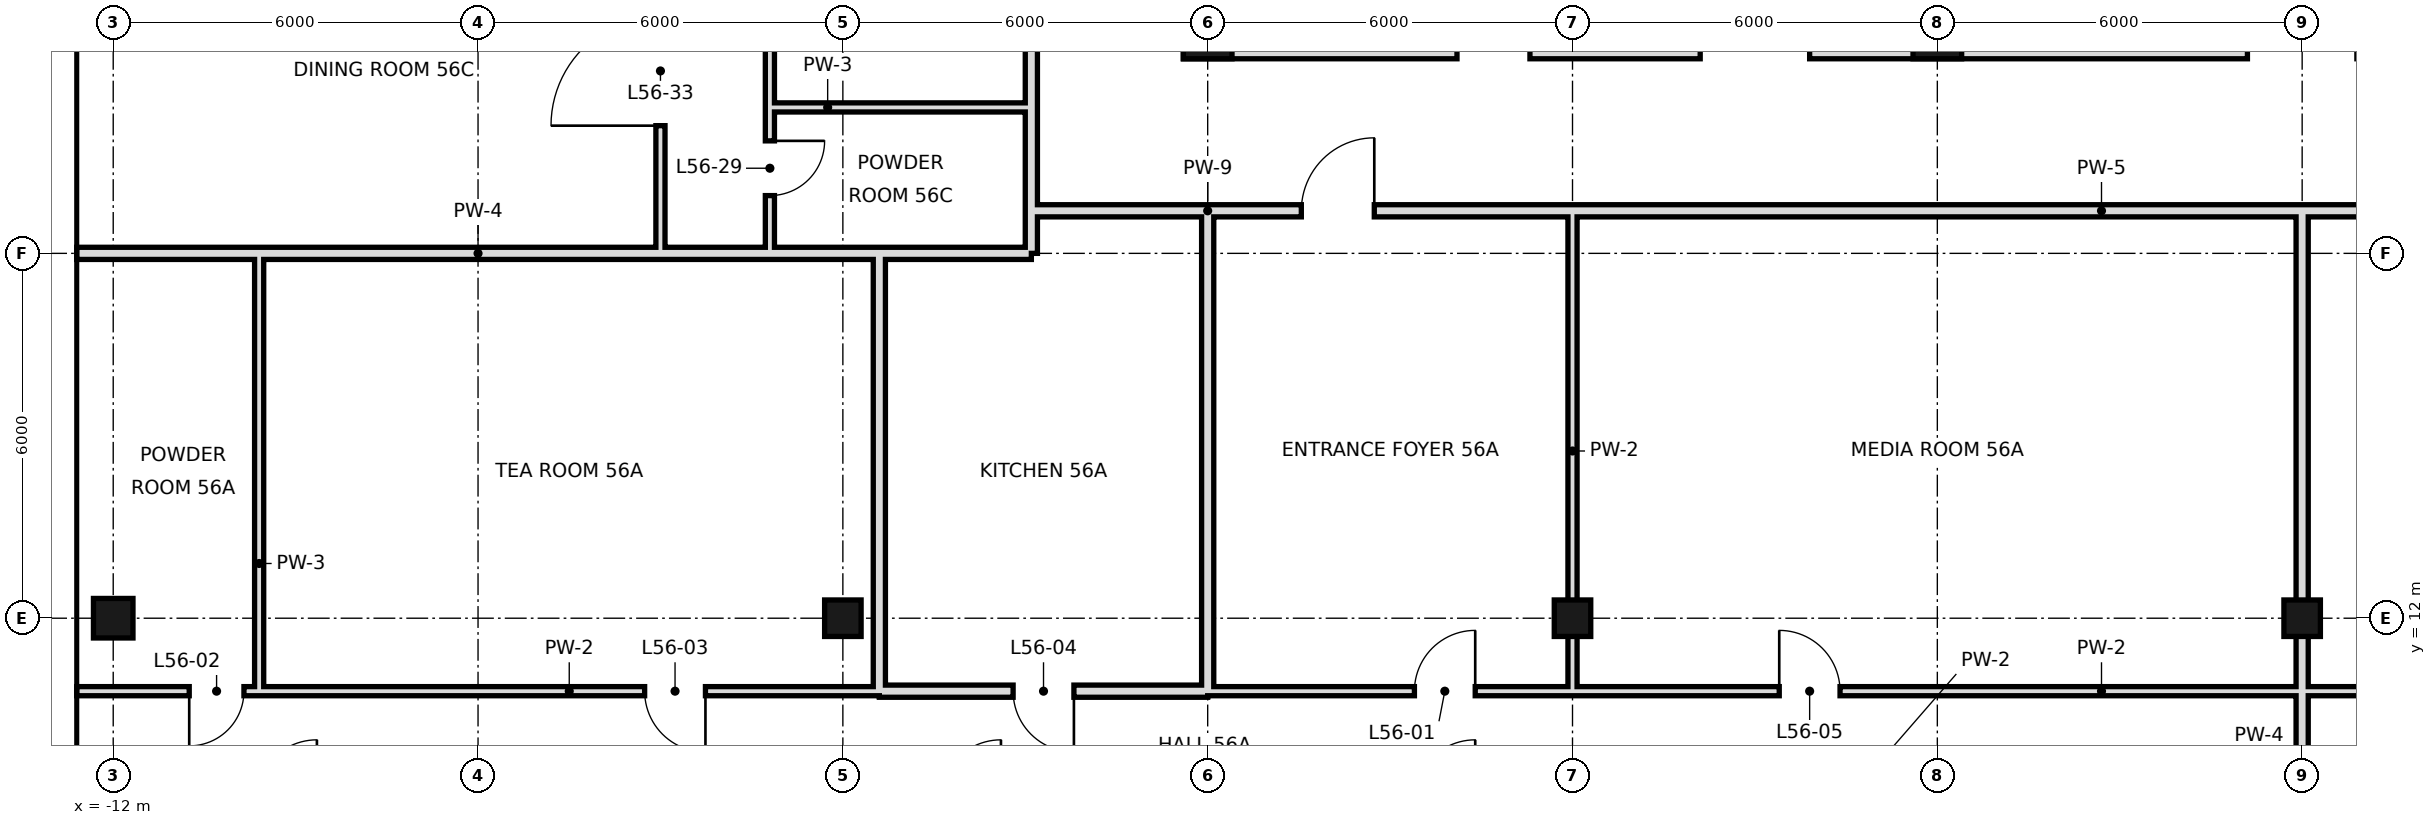
"""IFC4 building model, lengths in metres.
Left out: names, types, materials, properties, quantities, classifications, styles, units other than length and angle.
Written with IfcOpenShell. Run it as: python <this file> out.ifc"""

import sys

from ifc_helpers import new_model, si_unit, direction, frame, frame_2d, origin, origin_2d, place, context, subcontext, project, spatial, rectangle, hollow_rectangle, extrude, element, fill, save


model = new_model("IFC4")
c1 = context("Model", 3, precision=1e-05, world=origin(), true_north=direction((0.0, 1.0)))
c2 = subcontext(c1, "Body", "Model", "MODEL_VIEW")
j1 = project(units=[si_unit("LENGTHUNIT", "METRE"), si_unit("PLANEANGLEUNIT", "RADIAN")], contexts=[c1])
p1 = place(None, origin())
s1 = spatial("IfcSite", under=j1, at=p1, CompositionType="ELEMENT")
p2 = place(p1, origin())
s2 = spatial("IfcBuilding", under=s1, at=p2, CompositionType="ELEMENT")
p3 = place(p2, frame((0.0, 0.0, 239.6)))
s3 = spatial("IfcBuildingStorey", under=s2, at=p3, CompositionType="ELEMENT", Elevation=239.6)
p4 = place(p3, frame((-12.0, 12.0, 0.0), z_axis=(0.0, 0.0, 1.0), x_axis=(1.0, 0.0, 0.0)))
e1 = element("IfcColumn", 1, at=p4, inside=s3, PredefinedType="COLUMN", context=c2, shape_type="SweptSolid", body=[
    extrude(hollow_rectangle(XDim=0.65, YDim=0.65, WallThickness=0.032, at=origin_2d()), origin(), (0.0, 0.0, 1.0), 3.6),
])
p5 = place(p3, frame((0.0, 12.0, 0.0), z_axis=(0.0, 0.0, 1.0), x_axis=(1.0, 0.0, 0.0)))
e2 = element("IfcColumn", 2, at=p5, inside=s3, PredefinedType="COLUMN", context=c2, shape_type="SweptSolid", body=[
    extrude(hollow_rectangle(XDim=0.6, YDim=0.6, WallThickness=0.028, at=origin_2d()), origin(), (0.0, 0.0, 1.0), 3.6),
])
p6 = place(p3, frame((6.0, 21.6, 0.0), z_axis=(0.0, 0.0, 1.0), x_axis=(1.0, 0.0, 0.0)))
e3 = element("IfcColumn", 3, at=p6, inside=s3, PredefinedType="COLUMN", context=c2, shape_type="SweptSolid", body=[
    extrude(hollow_rectangle(XDim=0.8, YDim=0.8, WallThickness=0.04, at=origin_2d()), origin(), (0.0, 0.0, 1.0), 3.6),
])
p7 = place(p3, frame((12.0, 12.0, 0.0), z_axis=(0.0, 0.0, 1.0), x_axis=(1.0, 0.0, 0.0)))
e4 = element("IfcColumn", 4, at=p7, inside=s3, PredefinedType="COLUMN", context=c2, shape_type="SweptSolid", body=[
    extrude(hollow_rectangle(XDim=0.6, YDim=0.6, WallThickness=0.028, at=origin_2d()), origin(), (0.0, 0.0, 1.0), 3.6),
])
p8 = place(p3, frame((18.0, 21.6, 0.0), z_axis=(0.0, 0.0, 1.0), x_axis=(1.0, 0.0, 0.0)))
e5 = element("IfcColumn", 5, at=p8, inside=s3, PredefinedType="COLUMN", context=c2, shape_type="SweptSolid", body=[
    extrude(hollow_rectangle(XDim=0.8, YDim=0.8, WallThickness=0.04, at=origin_2d()), origin(), (0.0, 0.0, 1.0), 3.6),
])
p9 = place(p3, frame((24.0, 12.0, 0.0), z_axis=(0.0, 0.0, 1.0), x_axis=(1.0, 0.0, 0.0)))
e6 = element("IfcColumn", 6, at=p9, inside=s3, PredefinedType="COLUMN", context=c2, shape_type="SweptSolid", body=[
    extrude(hollow_rectangle(XDim=0.6, YDim=0.6, WallThickness=0.028, at=origin_2d()), origin(), (0.0, 0.0, 1.0), 3.6),
])
p10 = place(p3, frame((-1.2, 20.4, 0.0), z_axis=(0.0, 0.0, 1.0), x_axis=(0.0, 1.0, 0.0)))
e7 = element("IfcWall", 7, at=p10, inside=s3, PredefinedType="PARTITIONING", context=c2, shape_type="SweptSolid", body=[
    extrude(rectangle(XDim=12.0, YDim=0.15, at=frame_2d((6.0, 0.0))), origin(), (0.0, 0.0, 1.0), 3.42),
])
p11 = place(p10, frame((9.28, 0.0, 0.0)))
e8 = element("IfcOpeningElement", 8, at=p11, cuts=e7, PredefinedType="OPENING", context=c2, shape_type="SweptSolid", body=[
    extrude(rectangle(XDim=1.0, YDim=2.4, at=frame_2d((0.5, 1.2))), frame((0.0, 0.085, 0.0), z_axis=(0.0, -1.0, 0.0), x_axis=(1.0, 0.0, 0.0)), (0.0, 0.0, 1.0), 0.17),
])
p12 = place(p10, frame((5.08, 0.0, 0.0)))
e9 = element("IfcOpeningElement", 9, at=p12, cuts=e7, PredefinedType="OPENING", context=c2, shape_type="SweptSolid", body=[
    extrude(rectangle(XDim=1.0, YDim=2.4, at=frame_2d((0.5, 1.2))), frame((0.0, 0.085, 0.0), z_axis=(0.0, -1.0, 0.0), x_axis=(1.0, 0.0, 0.0)), (0.0, 0.0, 1.0), 0.17),
])
p13 = place(p3, frame((-1.2, 18.0, 0.0), z_axis=(0.0, 0.0, 1.0), x_axis=(0.0, 1.0, 0.0)))
e10 = element("IfcWall", 10, at=p13, inside=s3, PredefinedType="PARTITIONING", context=c2, shape_type="SweptSolid", body=[
    extrude(rectangle(XDim=2.4, YDim=0.15, at=frame_2d((1.2, 0.0))), origin(), (0.0, 0.0, 1.0), 3.42),
])
p14 = place(p13, frame((0.95, 0.0, 0.0)))
e11 = element("IfcOpeningElement", 11, at=p14, cuts=e10, PredefinedType="OPENING", context=c2, shape_type="SweptSolid", body=[
    extrude(rectangle(XDim=0.9, YDim=2.4, at=frame_2d((0.45, 1.2))), frame((0.0, 0.085, 0.0), z_axis=(0.0, -1.0, 0.0), x_axis=(1.0, 0.0, 0.0)), (0.0, 0.0, 1.0), 0.17),
])
p15 = place(p3, frame((-3.0, 18.0, 0.0), z_axis=(0.0, 0.0, 1.0), x_axis=(0.0, 1.0, 0.0)))
e12 = element("IfcWall", 12, at=p15, inside=s3, PredefinedType="PARTITIONING", context=c2, shape_type="SweptSolid", body=[
    extrude(rectangle(XDim=18.0, YDim=0.15, at=frame_2d((9.0, 0.0))), origin(), (0.0, 0.0, 1.0), 3.42),
])
p16 = place(p15, frame((2.1, 0.0, 0.0)))
e13 = element("IfcOpeningElement", 13, at=p16, cuts=e12, PredefinedType="OPENING", context=c2, shape_type="SweptSolid", body=[
    extrude(rectangle(XDim=1.8, YDim=2.4, at=frame_2d((0.9, 1.2))), frame((0.0, 0.085, 0.0), z_axis=(0.0, -1.0, 0.0), x_axis=(1.0, 0.0, 0.0)), (0.0, 0.0, 1.0), 0.17),
])
p17 = place(p15, frame((13.04, 0.0, 0.0)))
e14 = element("IfcOpeningElement", 14, at=p17, cuts=e12, PredefinedType="OPENING", context=c2, shape_type="SweptSolid", body=[
    extrude(rectangle(XDim=1.8, YDim=2.4, at=frame_2d((0.9, 1.2))), frame((0.0, 0.085, 0.0), z_axis=(0.0, -1.0, 0.0), x_axis=(1.0, 0.0, 0.0)), (0.0, 0.0, 1.0), 0.17),
])
p18 = place(p3, frame((-9.6, 10.8, 0.0), z_axis=(0.0, 0.0, 1.0), x_axis=(0.0, 1.0, 0.0)))
e15 = element("IfcWall", 15, at=p18, inside=s3, PredefinedType="PARTITIONING", context=c2, shape_type="SweptSolid", body=[
    extrude(rectangle(XDim=7.2, YDim=0.15, at=frame_2d((3.6, 0.0))), origin(), (0.0, 0.0, 1.0), 3.42),
])
p19 = place(p3, frame((0.6, 10.8, 0.0), z_axis=(0.0, 0.0, 1.0), x_axis=(0.0, 1.0, 0.0)))
e16 = element("IfcWall", 16, at=p19, inside=s3, PredefinedType="SOLIDWALL", context=c2, shape_type="SweptSolid", body=[
    extrude(rectangle(XDim=7.2, YDim=0.2, at=frame_2d((3.6, 0.0))), origin(), (0.0, 0.0, 1.0), 2.72),
])
p20 = place(p3, frame((12.0, 10.8, 0.0), z_axis=(0.0, 0.0, 1.0), x_axis=(0.0, 1.0, 0.0)))
e17 = element("IfcWall", 17, at=p20, inside=s3, PredefinedType="PARTITIONING", context=c2, shape_type="SweptSolid", body=[
    extrude(rectangle(XDim=7.9, YDim=0.15, at=frame_2d((3.95, 0.0))), origin(), (0.0, 0.0, 1.0), 2.72),
])
p21 = place(p3, frame((24.0, 0.0, 0.0), z_axis=(0.0, 0.0, 1.0), x_axis=(0.0, 1.0, 0.0)))
e18 = element("IfcWall", 18, at=p21, inside=s3, PredefinedType="SOLIDWALL", context=c2, shape_type="SweptSolid", body=[
    extrude(rectangle(XDim=18.7, YDim=0.2, at=frame_2d((9.35, 0.0))), origin(), (0.0, 0.0, 1.0), 2.72),
])
p22 = place(p3, frame((3.1, 18.7, 0.0), z_axis=(0.0, 0.0, 1.0), x_axis=(0.0, 1.0, 0.0)))
e19 = element("IfcWall", 19, at=p22, inside=s3, PredefinedType="SOLIDWALL", context=c2, shape_type="SweptSolid", body=[
    extrude(rectangle(XDim=13.7, YDim=0.2, at=frame_2d((6.85, 0.0))), origin(), (0.0, 0.0, 1.0), 2.97),
])
p23 = place(p22, frame((11.3, 0.0, 0.0)))
e20 = element("IfcOpeningElement", 20, at=p23, cuts=e19, PredefinedType="OPENING", context=c2, shape_type="SweptSolid", body=[
    extrude(rectangle(XDim=1.2, YDim=2.4, at=frame_2d((0.6, 1.2))), frame((0.0, 0.11, 0.0), z_axis=(0.0, -1.0, 0.0), x_axis=(1.0, 0.0, 0.0)), (0.0, 0.0, 1.0), 0.22),
])
p24 = place(p3, frame((3.1, 18.0, 0.0), z_axis=(0.0, 0.0, 1.0), x_axis=(0.0, 1.0, 0.0)))
e21 = element("IfcWall", 21, at=p24, inside=s3, PredefinedType="SOLIDWALL", context=c2, shape_type="SweptSolid", body=[
    extrude(rectangle(XDim=0.7, YDim=0.2, at=frame_2d((0.35, 0.0))), origin(), (0.0, 0.0, 1.0), 2.97),
])
p25 = place(p3, frame((6.0, 10.8, 0.0), z_axis=(0.0, 0.0, 1.0), x_axis=(0.0, 1.0, 0.0)))
e22 = element("IfcWall", 22, at=p25, inside=s3, PredefinedType="SOLIDWALL", context=c2, shape_type="SweptSolid", body=[
    extrude(rectangle(XDim=7.9, YDim=0.2, at=frame_2d((3.95, 0.0))), origin(), (0.0, 0.0, 1.0), 2.72),
])
p26 = place(p3, frame((0.6, 10.8, 0.0), z_axis=(0.0, 0.0, 1.0), x_axis=(1.0, 0.0, 0.0)))
e23 = element("IfcWall", 23, at=p26, inside=s3, PredefinedType="SOLIDWALL", context=c2, shape_type="SweptSolid", body=[
    extrude(rectangle(XDim=5.4, YDim=0.2, at=frame_2d((2.7, 0.0))), origin(), (0.0, 0.0, 1.0), 2.72),
])
p27 = place(p26, frame((2.2, 0.0, 0.0)))
e24 = element("IfcOpeningElement", 24, at=p27, cuts=e23, PredefinedType="OPENING", context=c2, shape_type="SweptSolid", body=[
    extrude(rectangle(XDim=1.0, YDim=2.4, at=frame_2d((0.5, 1.2))), frame((0.0, 0.11, 0.0), z_axis=(0.0, -1.0, 0.0), x_axis=(1.0, 0.0, 0.0)), (0.0, 0.0, 1.0), 0.22),
])
p28 = place(p3, frame((-9.6, 10.8, 0.0), z_axis=(0.0, 0.0, 1.0), x_axis=(1.0, 0.0, 0.0)))
e25 = element("IfcWall", 25, at=p28, inside=s3, PredefinedType="PARTITIONING", context=c2, shape_type="SweptSolid", body=[
    extrude(rectangle(XDim=10.2, YDim=0.15, at=frame_2d((5.1, 0.0))), origin(), (0.0, 0.0, 1.0), 3.42),
])
p29 = place(p28, frame((6.34, 0.0, 0.0)))
e26 = element("IfcOpeningElement", 26, at=p29, cuts=e25, PredefinedType="OPENING", context=c2, shape_type="SweptSolid", body=[
    extrude(rectangle(XDim=1.0, YDim=2.4, at=frame_2d((0.5, 1.2))), frame((0.0, 0.085, 0.0), z_axis=(0.0, -1.0, 0.0), x_axis=(1.0, 0.0, 0.0)), (0.0, 0.0, 1.0), 0.17),
])
p30 = place(p3, frame((6.0, 10.8, 0.0), z_axis=(0.0, 0.0, 1.0), x_axis=(1.0, 0.0, 0.0)))
e27 = element("IfcWall", 27, at=p30, inside=s3, PredefinedType="PARTITIONING", context=c2, shape_type="SweptSolid", body=[
    extrude(rectangle(XDim=29.4, YDim=0.15, at=frame_2d((14.7, 0.0))), origin(), (0.0, 0.0, 1.0), 3.42),
])
p31 = place(p30, frame((3.4, 0.0, 0.0)))
e28 = element("IfcOpeningElement", 28, at=p31, cuts=e27, PredefinedType="OPENING", context=c2, shape_type="SweptSolid", body=[
    extrude(rectangle(XDim=1.0, YDim=2.4, at=frame_2d((0.5, 1.2))), frame((0.0, 0.085, 0.0), z_axis=(0.0, -1.0, 0.0), x_axis=(1.0, 0.0, 0.0)), (0.0, 0.0, 1.0), 0.17),
])
p32 = place(p30, frame((9.4, 0.0, 0.0)))
e29 = element("IfcOpeningElement", 29, at=p32, cuts=e27, PredefinedType="OPENING", context=c2, shape_type="SweptSolid", body=[
    extrude(rectangle(XDim=1.0, YDim=2.4, at=frame_2d((0.5, 1.2))), frame((0.0, 0.085, 0.0), z_axis=(0.0, -1.0, 0.0), x_axis=(1.0, 0.0, 0.0)), (0.0, 0.0, 1.0), 0.17),
])
p33 = place(p30, frame((19.3, 0.0, 0.0)))
e30 = element("IfcOpeningElement", 30, at=p33, cuts=e27, PredefinedType="OPENING", context=c2, shape_type="SweptSolid", body=[
    extrude(rectangle(XDim=1.0, YDim=2.4, at=frame_2d((0.5, 1.2))), frame((0.0, 0.085, 0.0), z_axis=(0.0, -1.0, 0.0), x_axis=(1.0, 0.0, 0.0)), (0.0, 0.0, 1.0), 0.17),
])
p34 = place(p30, frame((25.0, 0.0, 0.0)))
e31 = element("IfcOpeningElement", 31, at=p34, cuts=e27, PredefinedType="OPENING", context=c2, shape_type="SweptSolid", body=[
    extrude(rectangle(XDim=1.0, YDim=2.4, at=frame_2d((0.5, 1.2))), frame((0.0, 0.085, 0.0), z_axis=(0.0, -1.0, 0.0), x_axis=(1.0, 0.0, 0.0)), (0.0, 0.0, 1.0), 0.17),
])
p35 = place(p3, frame((-12.6, 10.8, 0.0), z_axis=(0.0, 0.0, 1.0), x_axis=(1.0, 0.0, 0.0)))
e32 = element("IfcWall", 32, at=p35, inside=s3, PredefinedType="PARTITIONING", context=c2, shape_type="SweptSolid", body=[
    extrude(rectangle(XDim=3.0, YDim=0.15, at=frame_2d((1.5, 0.0))), origin(), (0.0, 0.0, 1.0), 3.42),
])
p36 = place(p35, frame((1.85, 0.0, 0.0)))
e33 = element("IfcOpeningElement", 33, at=p36, cuts=e32, PredefinedType="OPENING", context=c2, shape_type="SweptSolid", body=[
    extrude(rectangle(XDim=0.9, YDim=2.4, at=frame_2d((0.45, 1.2))), frame((0.0, 0.085, 0.0), z_axis=(0.0, -1.0, 0.0), x_axis=(1.0, 0.0, 0.0)), (0.0, 0.0, 1.0), 0.17),
])
p37 = place(p3, frame((0.6, 18.0, 0.0), z_axis=(0.0, 0.0, 1.0), x_axis=(1.0, 0.0, 0.0)))
e34 = element("IfcWall", 34, at=p37, inside=s3, PredefinedType="SOLIDWALL", context=c2, shape_type="SweptSolid", body=[
    extrude(rectangle(XDim=2.5, YDim=0.2, at=frame_2d((1.25, 0.0))), origin(), (0.0, 0.0, 1.0), 2.97),
])
p38 = place(p3, frame((-12.6, 18.0, 0.0), z_axis=(0.0, 0.0, 1.0), x_axis=(1.0, 0.0, 0.0)))
e35 = element("IfcWall", 35, at=p38, inside=s3, PredefinedType="SOLIDWALL", context=c2, shape_type="SweptSolid", body=[
    extrude(rectangle(XDim=13.2, YDim=0.2, at=frame_2d((6.6, 0.0))), origin(), (0.0, 0.0, 1.0), 2.72),
])
p39 = place(p3, frame((6.0, 18.7, 0.0), z_axis=(0.0, 0.0, 1.0), x_axis=(1.0, 0.0, 0.0)))
e36 = element("IfcWall", 36, at=p39, inside=s3, PredefinedType="SOLIDWALL", context=c2, shape_type="SweptSolid", body=[
    extrude(rectangle(XDim=29.4, YDim=0.2, at=frame_2d((14.7, 0.0))), origin(), (0.0, 0.0, 1.0), 2.72),
])
p40 = place(p39, frame((1.54, 0.0, 0.0)))
e37 = element("IfcOpeningElement", 37, at=p40, cuts=e36, PredefinedType="OPENING", context=c2, shape_type="SweptSolid", body=[
    extrude(rectangle(XDim=1.2, YDim=2.4, at=frame_2d((0.6, 1.2))), frame((0.0, 0.11, 0.0), z_axis=(0.0, -1.0, 0.0), x_axis=(1.0, 0.0, 0.0)), (0.0, 0.0, 1.0), 0.22),
])
p41 = place(p39, frame((19.58, 0.0, 0.0)))
e38 = element("IfcOpeningElement", 38, at=p41, cuts=e36, PredefinedType="OPENING", context=c2, shape_type="SweptSolid", body=[
    extrude(rectangle(XDim=1.2, YDim=2.4, at=frame_2d((0.6, 1.2))), frame((0.0, 0.11, 0.0), z_axis=(0.0, -1.0, 0.0), x_axis=(1.0, 0.0, 0.0)), (0.0, 0.0, 1.0), 0.22),
])
p42 = place(p3, frame((3.1, 18.7, 0.0), z_axis=(0.0, 0.0, 1.0), x_axis=(1.0, 0.0, 0.0)))
e39 = element("IfcWall", 39, at=p42, inside=s3, PredefinedType="SOLIDWALL", context=c2, shape_type="SweptSolid", body=[
    extrude(rectangle(XDim=2.9, YDim=0.2, at=frame_2d((1.45, 0.0))), origin(), (0.0, 0.0, 1.0), 2.72),
])
p43 = place(p3, frame((-1.2, 20.4, 0.0), z_axis=(0.0, 0.0, 1.0), x_axis=(1.0, 0.0, 0.0)))
e40 = element("IfcWall", 40, at=p43, inside=s3, PredefinedType="PARTITIONING", context=c2, shape_type="SweptSolid", body=[
    extrude(rectangle(XDim=4.3, YDim=0.15, at=frame_2d((2.15, 0.0))), origin(), (0.0, 0.0, 1.0), 3.42),
])
p44 = place(p3, frame((5.6, 21.4, 0.0), z_axis=(0.0, 0.0, 1.0), x_axis=(1.0, 0.0, 0.0)))
e41 = element("IfcWall", 41, at=p44, inside=s3, PredefinedType="SOLIDWALL", context=c2, shape_type="SweptSolid", body=[
    extrude(rectangle(XDim=36.8, YDim=0.4, at=frame_2d((18.4, 0.0))), origin(), (0.0, 0.0, 1.0), 3.42),
])
p45 = place(p44, frame((8.5, 0.0, 0.0)))
e42 = element("IfcOpeningElement", 42, at=p45, cuts=e41, PredefinedType="OPENING", context=c2, shape_type="SweptSolid", body=[
    extrude(rectangle(XDim=1.8, YDim=2.1, at=frame_2d((0.9, 1.05))), frame((0.0, 0.21, 0.0), z_axis=(0.0, -1.0, 0.0), x_axis=(1.0, 0.0, 0.0)), (0.0, 0.0, 1.0), 0.42),
])
p46 = place(p44, frame((17.5, 0.0, 0.0)))
e43 = element("IfcOpeningElement", 43, at=p46, cuts=e41, PredefinedType="OPENING", context=c2, shape_type="SweptSolid", body=[
    extrude(rectangle(XDim=1.8, YDim=2.1, at=frame_2d((0.9, 1.05))), frame((0.0, 0.21, 0.0), z_axis=(0.0, -1.0, 0.0), x_axis=(1.0, 0.0, 0.0)), (0.0, 0.0, 1.0), 0.42),
])
p47 = place(p44, frame((26.5, 0.0, 0.0)))
e44 = element("IfcOpeningElement", 44, at=p47, cuts=e41, PredefinedType="OPENING", context=c2, shape_type="SweptSolid", body=[
    extrude(rectangle(XDim=1.8, YDim=2.1, at=frame_2d((0.9, 1.05))), frame((0.0, 0.21, 0.0), z_axis=(0.0, -1.0, 0.0), x_axis=(1.0, 0.0, 0.0)), (0.0, 0.0, 1.0), 0.42),
])
p48 = place(p44, frame((4.5, 0.0, 0.0)))
e45 = element("IfcOpeningElement", 45, at=p48, cuts=e41, PredefinedType="OPENING", context=c2, shape_type="SweptSolid", body=[
    extrude(rectangle(XDim=1.2, YDim=2.1, at=frame_2d((0.6, 1.05))), frame((0.0, 0.21, 0.0), z_axis=(0.0, -1.0, 0.0), x_axis=(1.0, 0.0, 0.0)), (0.0, 0.0, 1.0), 0.42),
])
p49 = place(p44, frame((31.1, 0.0, 0.0)))
e46 = element("IfcOpeningElement", 46, at=p49, cuts=e41, PredefinedType="OPENING", context=c2, shape_type="SweptSolid", body=[
    extrude(rectangle(XDim=1.2, YDim=2.1, at=frame_2d((0.6, 1.05))), frame((0.0, 0.21, 0.0), z_axis=(0.0, -1.0, 0.0), x_axis=(1.0, 0.0, 0.0)), (0.0, 0.0, 1.0), 0.42),
])
p50 = place(p31, frame((1.0, 0.0, 0.0), z_axis=(0.0, 0.0, 1.0), x_axis=(-1.0, 0.0, 0.0)))
e47 = element("IfcDoor", 47, at=p50, inside=s3, OperationType="SINGLE_SWING_LEFT", PredefinedType="DOOR", context=c2, shape_type="SweptSolid", body=[
    extrude(rectangle(XDim=1.0, YDim=2.4, at=frame_2d((0.5, 1.2))), frame((0.0, 0.025, 0.0), z_axis=(0.0, -1.0, 0.0), x_axis=(1.0, 0.0, 0.0)), (0.0, 0.0, 1.0), 0.05),
])
fill(e28, e47)
p51 = place(p36, frame((0.9, 0.0, 0.0), z_axis=(0.0, 0.0, 1.0), x_axis=(-1.0, 0.0, 0.0)))
e48 = element("IfcDoor", 48, at=p51, inside=s3, OperationType="SINGLE_SWING_RIGHT", PredefinedType="DOOR", context=c2, shape_type="SweptSolid", body=[
    extrude(rectangle(XDim=0.9, YDim=2.4, at=frame_2d((0.45, 1.2))), frame((0.0, 0.025, 0.0), z_axis=(0.0, -1.0, 0.0), x_axis=(1.0, 0.0, 0.0)), (0.0, 0.0, 1.0), 0.05),
])
fill(e33, e48)
p52 = place(p29, origin())
e49 = element("IfcDoor", 49, at=p52, inside=s3, OperationType="SINGLE_SWING_RIGHT", PredefinedType="DOOR", context=c2, shape_type="SweptSolid", body=[
    extrude(rectangle(XDim=1.0, YDim=2.4, at=frame_2d((0.5, 1.2))), frame((0.0, 0.025, 0.0), z_axis=(0.0, -1.0, 0.0), x_axis=(1.0, 0.0, 0.0)), (0.0, 0.0, 1.0), 0.05),
])
fill(e26, e49)
p53 = place(p27, origin())
e50 = element("IfcDoor", 50, at=p53, inside=s3, OperationType="SINGLE_SWING_RIGHT", PredefinedType="DOOR", context=c2, shape_type="SweptSolid", body=[
    extrude(rectangle(XDim=1.0, YDim=2.4, at=frame_2d((0.5, 1.2))), frame((0.0, 0.025, 0.0), z_axis=(0.0, -1.0, 0.0), x_axis=(1.0, 0.0, 0.0)), (0.0, 0.0, 1.0), 0.05),
])
fill(e24, e50)
p54 = place(p32, origin())
e51 = element("IfcDoor", 51, at=p54, inside=s3, OperationType="SINGLE_SWING_LEFT", PredefinedType="DOOR", context=c2, shape_type="SweptSolid", body=[
    extrude(rectangle(XDim=1.0, YDim=2.4, at=frame_2d((0.5, 1.2))), frame((0.0, 0.025, 0.0), z_axis=(0.0, -1.0, 0.0), x_axis=(1.0, 0.0, 0.0)), (0.0, 0.0, 1.0), 0.05),
])
fill(e29, e51)
p55 = place(p14, origin())
e52 = element("IfcDoor", 52, at=p55, inside=s3, OperationType="SINGLE_SWING_RIGHT", PredefinedType="DOOR", context=c2, shape_type="SweptSolid", body=[
    extrude(rectangle(XDim=0.9, YDim=2.4, at=frame_2d((0.45, 1.2))), frame((0.0, 0.025, 0.0), z_axis=(0.0, -1.0, 0.0), x_axis=(1.0, 0.0, 0.0)), (0.0, 0.0, 1.0), 0.05),
])
fill(e11, e52)
p56 = place(p16, origin())
e53 = element("IfcDoor", 53, at=p56, inside=s3, OperationType="SINGLE_SWING_LEFT", PredefinedType="DOOR", context=c2, shape_type="SweptSolid", body=[
    extrude(rectangle(XDim=1.8, YDim=2.4, at=frame_2d((0.9, 1.2))), frame((0.0, 0.025, 0.0), z_axis=(0.0, -1.0, 0.0), x_axis=(1.0, 0.0, 0.0)), (0.0, 0.0, 1.0), 0.05),
])
fill(e13, e53)
p57 = place(p40, frame((1.2, 0.0, 0.0), z_axis=(0.0, 0.0, 1.0), x_axis=(-1.0, 0.0, 0.0)))
e54 = element("IfcDoor", 54, at=p57, inside=s3, OperationType="SINGLE_SWING_LEFT", PredefinedType="DOOR", context=c2, shape_type="SweptSolid", body=[
    extrude(rectangle(XDim=1.2, YDim=2.4, at=frame_2d((0.6, 1.2))), frame((0.0, 0.025, 0.0), z_axis=(0.0, -1.0, 0.0), x_axis=(1.0, 0.0, 0.0)), (0.0, 0.0, 1.0), 0.05),
])
fill(e37, e54)
save(model, sys.argv[1])
